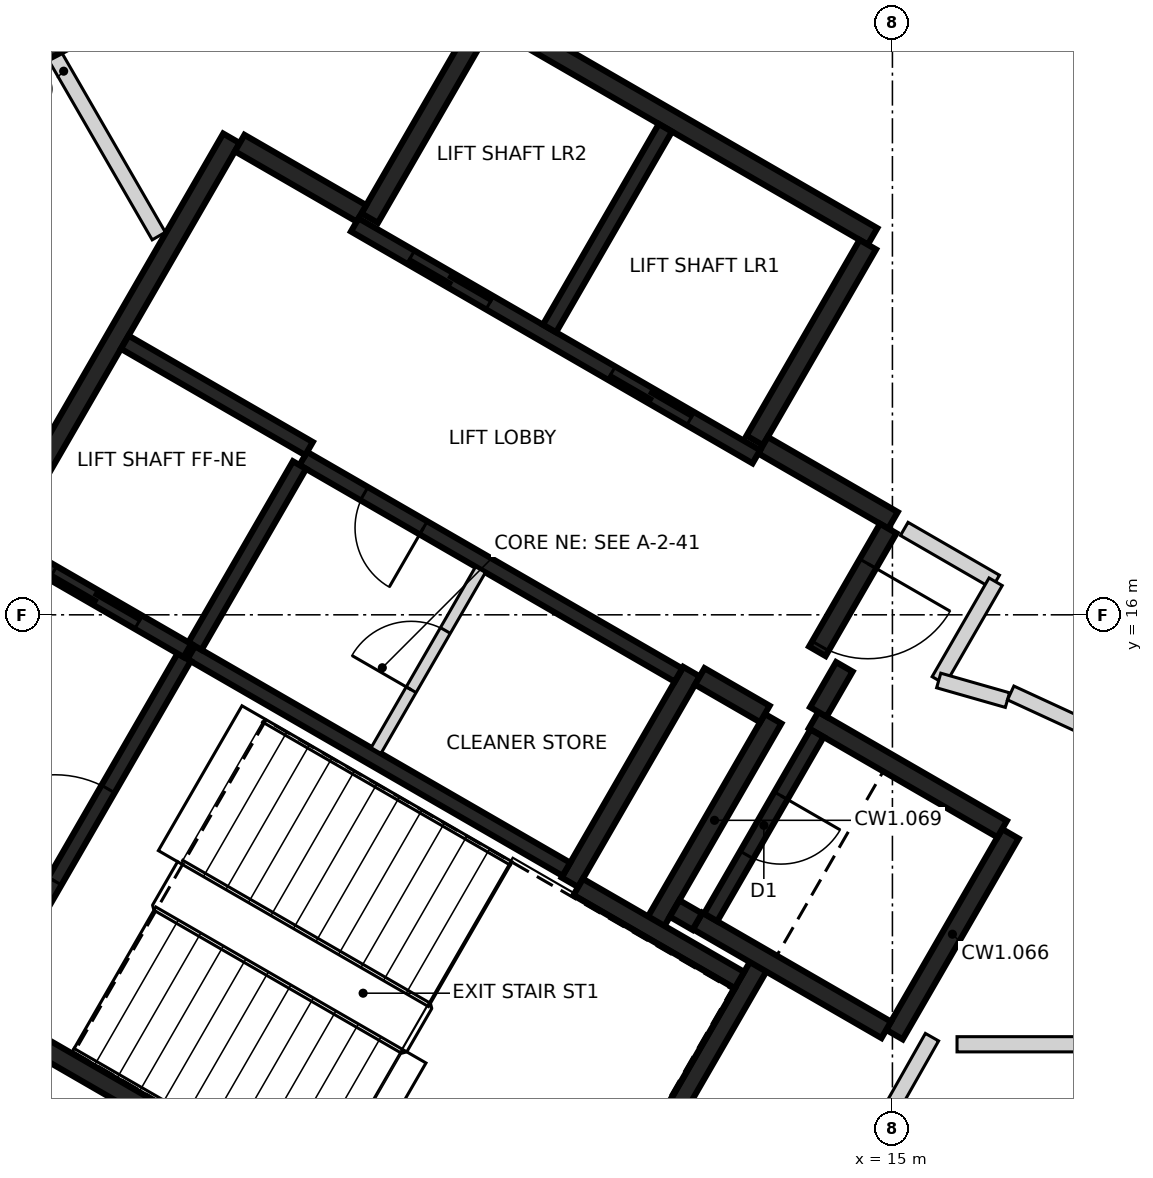
"""IFC4 building model, lengths in metres.
Left out: names, types, materials, properties, quantities, classifications, styles, units other than length and angle.
Written with IfcOpenShell. Run it as: python <this file> out.ifc"""

import sys

from ifc_helpers import new_model, si_unit, direction, frame, frame_2d, origin, origin_2d, place, context, subcontext, project, spatial, rectangle, extrude, element, fill, save


model = new_model("IFC4")
c1 = context("Model", 3, precision=1e-05, world=origin(), true_north=direction((0.0, 1.0)))
c2 = subcontext(c1, "Body", "Model", "MODEL_VIEW")
j1 = project(units=[si_unit("LENGTHUNIT", "METRE"), si_unit("PLANEANGLEUNIT", "RADIAN")], contexts=[c1])
p1 = place(None, origin())
s1 = spatial("IfcSite", under=j1, at=p1, CompositionType="ELEMENT")
p2 = place(p1, origin())
s2 = spatial("IfcBuilding", under=s1, at=p2, CompositionType="ELEMENT")
p3 = place(p2, frame((0.0, 0.0, 136.0)))
s3 = spatial("IfcBuildingStorey", under=s2, at=p3, CompositionType="ELEMENT", Elevation=136.0)
p4 = place(p3, frame((3.667, 23.896, -0.4), z_axis=(0.0, 0.0, 1.0), x_axis=(-0.463006774365, 0.886354740999, 0.0)))
e1 = element("IfcColumn", 1, at=p4, inside=s3, PredefinedType="COLUMN", context=c2, shape_type="SweptSolid", body=[
    extrude(rectangle(XDim=1.25, YDim=0.85, at=origin_2d()), origin(), (0.0, 0.0, 1.0), 3.6),
])
p5 = place(p3, frame((10.42, 6.498, 0.0), z_axis=(0.0, 0.0, 1.0), x_axis=(-0.866021906294, 0.500006057782, 0.0)))
e2 = element("IfcWall", 2, at=p5, inside=s3, PredefinedType="SHEAR", context=c2, shape_type="SweptSolid", body=[
    extrude(rectangle(XDim=11.55, YDim=0.25, at=frame_2d((5.775, 0.0))), origin(), (0.0, 0.0, 1.0), 3.2),
])
p6 = place(p5, frame((10.025, 0.0, 0.0)))
e3 = element("IfcOpeningElement", 3, at=p6, cuts=e2, PredefinedType="OPENING", context=c2, shape_type="SweptSolid", body=[
    extrude(rectangle(XDim=1.2, YDim=2.1, at=frame_2d((0.6, 1.05))), frame((0.0, 0.135, 0.0), z_axis=(0.0, -1.0, 0.0), x_axis=(1.0, 0.0, 0.0)), (0.0, 0.0, 1.0), 0.27),
])
p7 = place(p5, frame((8.725, 0.0, 0.0)))
e4 = element("IfcOpeningElement", 4, at=p7, cuts=e2, PredefinedType="OPENING", context=c2, shape_type="SweptSolid", body=[
    extrude(rectangle(XDim=1.2, YDim=2.1, at=frame_2d((0.6, 1.05))), frame((0.0, 0.135, 0.0), z_axis=(0.0, -1.0, 0.0), x_axis=(1.0, 0.0, 0.0)), (0.0, 0.0, 1.0), 0.27),
])
p8 = place(p3, frame((3.179, 16.856, 0.0), z_axis=(0.0, 0.0, 1.0), x_axis=(0.500004234368, 0.866022959057, 0.0)))
e5 = element("IfcWall", 5, at=p8, inside=s3, PredefinedType="SHEAR", context=c2, shape_type="SweptSolid", body=[
    extrude(rectangle(XDim=6.25, YDim=0.25, at=frame_2d((3.125, 0.0))), origin(), (0.0, 0.0, 1.0), 3.2),
])
p9 = place(p3, frame((9.673, 23.903, 0.0), z_axis=(0.0, 0.0, 1.0), x_axis=(0.86603616409, -0.499981362141, 0.0)))
e6 = element("IfcWall", 6, at=p9, inside=s3, PredefinedType="SHEAR", context=c2, shape_type="SweptSolid", body=[
    extrude(rectangle(XDim=5.85, YDim=0.25, at=frame_2d((2.925, 0.0))), origin(), (0.0, 0.0, 1.0), 3.2),
])
p10 = place(p3, frame((13.238, 11.378, 0.0), z_axis=(0.0, 0.0, 1.0), x_axis=(-0.500008851346, -0.866020293397, 0.0)))
e7 = element("IfcWall", 7, at=p10, inside=s3, PredefinedType="SHEAR", context=c2, shape_type="SweptSolid", body=[
    extrude(rectangle(XDim=5.51, YDim=0.25, at=frame_2d((2.755, 0.0))), origin(), (0.0, 0.0, 1.0), 3.2),
])
p11 = place(p3, frame((12.357, 15.252, 0.0), z_axis=(0.0, 0.0, 1.0), x_axis=(-0.500028443584, -0.866008981251, 0.0)))
e8 = element("IfcWall", 8, at=p11, inside=s3, PredefinedType="SHEAR", context=c2, shape_type="SweptSolid", body=[
    extrude(rectangle(XDim=3.2, YDim=0.25, at=frame_2d((1.6, 0.0))), origin(), (0.0, 0.0, 1.0), 3.2),
])
for number, where, z_axis, x_axis in (
    (9, (8.123, 21.219, 0.0), (0.0, 0.0, 1.0), (0.5, 0.866, 0.0)),
    (10, (14.676, 20.87, 0.0), (0.0, 0.0, 1.0), (-0.5, -0.866, 0.0)),
):
    element("IfcWall", number, at=place(p3, frame(where, z_axis=z_axis, x_axis=x_axis)), inside=s3, PredefinedType="SHEAR", context=c2, shape_type="SweptSolid", body=[
        extrude(rectangle(XDim=2.975, YDim=0.25, at=frame_2d((1.487, 0.0))), origin(), (0.0, 0.0, 1.0), 3.2),
    ])
p12 = place(p3, frame((16.552, 13.119, 0.0), z_axis=(0.0, 0.0, 1.0), x_axis=(-0.499978833458, -0.866037623948, 0.0)))
e11 = element("IfcWall", 11, at=p12, inside=s3, PredefinedType="SHEAR", context=c2, shape_type="SweptSolid", body=[
    extrude(rectangle(XDim=3.05, YDim=0.25, at=frame_2d((1.525, 0.0))), origin(), (0.0, 0.0, 1.0), 3.2),
])
p13 = place(p3, frame((14.918, 10.54, 0.0), z_axis=(0.0, 0.0, 1.0), x_axis=(-0.866063538972, 0.499933942099, 0.0)))
e12 = element("IfcWall", 12, at=p13, inside=s3, PredefinedType="SHEAR", context=c2, shape_type="SweptSolid", body=[
    extrude(rectangle(XDim=2.865, YDim=0.25, at=frame_2d((1.432, 0.0))), origin(), (0.0, 0.0, 1.0), 3.2),
])
p14 = place(p3, frame((13.963, 14.614, 0.0), z_axis=(0.0, 0.0, 1.0), x_axis=(0.866042235819, -0.499970844928, 0.0)))
e13 = element("IfcWall", 13, at=p14, inside=s3, PredefinedType="SHEAR", context=c2, shape_type="SweptSolid", body=[
    extrude(rectangle(XDim=2.865, YDim=0.25, at=frame_2d((1.432, 0.0))), origin(), (0.0, 0.0, 1.0), 3.2),
])
p15 = place(p3, frame((11.888, 11.961, 0.0), z_axis=(0.0, 0.0, 1.0), x_axis=(0.500003324108, 0.866023484601, 0.0)))
e14 = element("IfcWall", 14, at=p15, inside=s3, PredefinedType="SHEAR", context=c2, shape_type="SweptSolid", body=[
    extrude(rectangle(XDim=3.085, YDim=0.25, at=frame_2d((1.542, 0.0))), origin(), (0.0, 0.0, 1.0), 3.2),
])
p16 = place(p3, frame((10.865, 12.418, 0.0), z_axis=(0.0, 0.0, 1.0), x_axis=(0.866026229868, -0.499998569178, 0.0)))
e15 = element("IfcWall", 15, at=p16, inside=s3, PredefinedType="SHEAR", context=c2, shape_type="SweptSolid", body=[
    extrude(rectangle(XDim=2.449, YDim=0.25, at=frame_2d((1.225, 0.0))), origin(), (0.0, 0.0, 1.0), 3.2),
])
p17 = place(p3, frame((13.297, 18.231, 0.0), z_axis=(0.0, 0.0, 1.0), x_axis=(0.866043531843, -0.499968599967, 0.0)))
e16 = element("IfcWall", 16, at=p17, inside=s3, PredefinedType="SHEAR", context=c2, shape_type="SweptSolid", body=[
    extrude(rectangle(XDim=1.975, YDim=0.25, at=frame_2d((0.987, 0.0))), origin(), (0.0, 0.0, 1.0), 3.2),
])
p18 = place(p3, frame((6.413, 22.206, 0.0), z_axis=(0.0, 0.0, 1.0), x_axis=(0.866016279763, -0.500015802937, 0.0)))
e17 = element("IfcWall", 17, at=p18, inside=s3, PredefinedType="SHEAR", context=c2, shape_type="SweptSolid", body=[
    extrude(rectangle(XDim=1.849, YDim=0.25, at=frame_2d((0.925, 0.0))), origin(), (0.0, 0.0, 1.0), 3.2),
])
p19 = place(p3, frame((14.945, 17.135, 0.0), z_axis=(0.0, 0.0, 1.0), x_axis=(-0.499983108224, -0.866035156036, 0.0)))
e18 = element("IfcWall", 18, at=p19, inside=s3, PredefinedType="SHEAR", context=c2, shape_type="SweptSolid", body=[
    extrude(rectangle(XDim=1.865, YDim=0.25, at=frame_2d((0.932, 0.0))), origin(), (0.0, 0.0, 1.0), 3.2),
])
p20 = place(p19, frame((0.535, 0.0, 0.0)))
e19 = element("IfcOpeningElement", 19, at=p20, cuts=e18, PredefinedType="OPENING", context=c2, shape_type="SweptSolid", body=[
    extrude(rectangle(XDim=1.25, YDim=2.1, at=frame_2d((0.625, 1.05))), frame((0.0, 0.135, 0.0), z_axis=(0.0, -1.0, 0.0), x_axis=(1.0, 0.0, 0.0)), (0.0, 0.0, 1.0), 0.27),
])
p21 = place(p3, frame((13.322, 14.695, 0.0), z_axis=(0.0, 0.0, 1.0), x_axis=(-0.866017078145, 0.500014420154, 0.0)))
e20 = element("IfcWall", 20, at=p21, inside=s3, PredefinedType="SHEAR", context=c2, shape_type="SweptSolid", body=[
    extrude(rectangle(XDim=0.989, YDim=0.25, at=frame_2d((0.495, 0.0))), origin(), (0.0, 0.0, 1.0), 3.2),
])
p22 = place(p3, frame((14.368, 15.315, 0.0), z_axis=(0.0, 0.0, 1.0), x_axis=(-0.499897359611, -0.866084655132, 0.0)))
e21 = element("IfcWall", 21, at=p22, inside=s3, PredefinedType="SHEAR", context=c2, shape_type="SweptSolid", body=[
    extrude(rectangle(XDim=0.685, YDim=0.25, at=frame_2d((0.342, 0.0))), origin(), (0.0, 0.0, 1.0), 3.2),
])
p23 = place(p3, frame((12.433, 11.964, 0.0), z_axis=(0.0, 0.0, 1.0), x_axis=(-0.866055875208, 0.499947218231, 0.0)))
e22 = element("IfcWall", 22, at=p23, inside=s3, PredefinedType="SHEAR", context=c2, shape_type="SweptSolid", body=[
    extrude(rectangle(XDim=0.345, YDim=0.25, at=frame_2d((0.172, 0.0))), origin(), (0.0, 0.0, 1.0), 3.2),
])
p24 = place(p3, frame((13.21, 18.08, 0.0), z_axis=(0.0, 0.0, 1.0), x_axis=(-0.866030299012, 0.499991521122, 0.0)))
e23 = element("IfcWall", 23, at=p24, inside=s3, PredefinedType="SHEAR", context=c2, shape_type="SweptSolid", body=[
    extrude(rectangle(XDim=6.1, YDim=0.2, at=frame_2d((3.05, 0.0))), origin(), (0.0, 0.0, 1.0), 3.2),
])
p25 = place(p24, frame((1.0, 0.0, 0.0)))
e24 = element("IfcOpeningElement", 24, at=p25, cuts=e23, PredefinedType="OPENING", context=c2, shape_type="SweptSolid", body=[
    extrude(rectangle(XDim=1.2, YDim=2.1, at=frame_2d((0.6, 1.05))), frame((0.0, 0.11, 0.0), z_axis=(0.0, -1.0, 0.0), x_axis=(1.0, 0.0, 0.0)), (0.0, 0.0, 1.0), 0.22),
])
p26 = place(p24, frame((4.05, 0.0, 0.0)))
e25 = element("IfcOpeningElement", 25, at=p26, cuts=e23, PredefinedType="OPENING", context=c2, shape_type="SweptSolid", body=[
    extrude(rectangle(XDim=1.2, YDim=2.1, at=frame_2d((0.6, 1.05))), frame((0.0, 0.11, 0.0), z_axis=(0.0, -1.0, 0.0), x_axis=(1.0, 0.0, 0.0)), (0.0, 0.0, 1.0), 0.22),
])
p27 = place(p3, frame((5.775, 15.502, 0.0), z_axis=(0.0, 0.0, 1.0), x_axis=(0.866020080793, -0.500009219579, 0.0)))
e26 = element("IfcWall", 26, at=p27, inside=s3, PredefinedType="SHEAR", context=c2, shape_type="SweptSolid", body=[
    extrude(rectangle(XDim=5.699, YDim=0.2, at=frame_2d((2.85, 0.0))), origin(), (0.0, 0.0, 1.0), 3.2),
])
p28 = place(p3, frame((12.185, 15.207, 0.0), z_axis=(0.0, 0.0, 1.0), x_axis=(-0.866020080793, 0.500009219579, 0.0)))
e27 = element("IfcWall", 27, at=p28, inside=s3, PredefinedType="SHEAR", context=c2, shape_type="SweptSolid", body=[
    extrude(rectangle(XDim=5.699, YDim=0.2, at=frame_2d((2.85, 0.0))), origin(), (0.0, 0.0, 1.0), 3.2),
])
p29 = place(p28, frame((3.874, 0.0, 0.0)))
e28 = element("IfcOpeningElement", 28, at=p29, cuts=e27, PredefinedType="OPENING", context=c2, shape_type="SweptSolid", body=[
    extrude(rectangle(XDim=0.9, YDim=2.1, at=frame_2d((0.45, 1.05))), frame((0.0, 0.11, 0.0), z_axis=(0.0, -1.0, 0.0), x_axis=(1.0, 0.0, 0.0)), (0.0, 0.0, 1.0), 0.22),
])
p30 = place(p3, frame((3.057, 10.895, 0.0), z_axis=(0.0, 0.0, 1.0), x_axis=(0.499989418164, 0.866031513124, 0.0)))
e29 = element("IfcWall", 29, at=p30, inside=s3, PredefinedType="SHEAR", context=c2, shape_type="SweptSolid", body=[
    extrude(rectangle(XDim=5.251, YDim=0.2, at=frame_2d((2.625, 0.0))), origin(), (0.0, 0.0, 1.0), 3.2),
])
p31 = place(p30, frame((1.849, 0.0, 0.0)))
e30 = element("IfcOpeningElement", 30, at=p31, cuts=e29, PredefinedType="OPENING", context=c2, shape_type="SweptSolid", body=[
    extrude(rectangle(XDim=1.4, YDim=2.1, at=frame_2d((0.7, 1.05))), frame((0.0, 0.11, 0.0), z_axis=(0.0, -1.0, 0.0), x_axis=(1.0, 0.0, 0.0)), (0.0, 0.0, 1.0), 0.22),
])
p32 = place(p3, frame((10.489, 19.767, 0.0), z_axis=(0.0, 0.0, 1.0), x_axis=(0.499946628782, 0.866056215479, 0.0)))
e31 = element("IfcWall", 31, at=p32, inside=s3, PredefinedType="SHEAR", context=c2, shape_type="SweptSolid", body=[
    extrude(rectangle(XDim=3.048, YDim=0.2, at=frame_2d((1.524, 0.0))), origin(), (0.0, 0.0, 1.0), 3.2),
])
p33 = place(p3, frame((14.008, 14.442, 0.0), z_axis=(0.0, 0.0, 1.0), x_axis=(-0.499986818241, -0.866033014143, 0.0)))
e32 = element("IfcWall", 32, at=p33, inside=s3, PredefinedType="SHEAR", context=c2, shape_type="SweptSolid", body=[
    extrude(rectangle(XDim=2.798, YDim=0.2, at=frame_2d((1.399, 0.0))), origin(), (0.0, 0.0, 1.0), 3.2),
])
p34 = place(p33, frame((0.949, 0.0, 0.0)))
e33 = element("IfcOpeningElement", 33, at=p34, cuts=e32, PredefinedType="OPENING", context=c2, shape_type="SweptSolid", body=[
    extrude(rectangle(XDim=0.9, YDim=2.1, at=frame_2d((0.45, 1.05))), frame((0.0, 0.11, 0.0), z_axis=(0.0, -1.0, 0.0), x_axis=(1.0, 0.0, 0.0)), (0.0, 0.0, 1.0), 0.22),
])
p35 = place(p3, frame((7.199, 17.97, 0.0), z_axis=(0.0, 0.0, 1.0), x_axis=(-0.499968400327, -0.866043647095, 0.0)))
e34 = element("IfcWall", 34, at=p35, inside=s3, PredefinedType="SHEAR", context=c2, shape_type="SweptSolid", body=[
    extrude(rectangle(XDim=2.75, YDim=0.2, at=frame_2d((1.375, 0.0))), origin(), (0.0, 0.0, 1.0), 3.2),
])
p36 = place(p3, frame((5.725, 15.531, 0.0), z_axis=(0.0, 0.0, 1.0), x_axis=(-0.866037306777, 0.499979382845, 0.0)))
e35 = element("IfcWall", 35, at=p36, inside=s3, PredefinedType="SHEAR", context=c2, shape_type="SweptSolid", body=[
    extrude(rectangle(XDim=2.742, YDim=0.2, at=frame_2d((1.371, 0.0))), origin(), (0.0, 0.0, 1.0), 3.2),
])
p37 = place(p36, frame((0.743, 0.0, 0.0)))
e36 = element("IfcOpeningElement", 36, at=p37, cuts=e35, PredefinedType="OPENING", context=c2, shape_type="SweptSolid", body=[
    extrude(rectangle(XDim=1.3, YDim=2.1, at=frame_2d((0.65, 1.05))), frame((0.0, 0.11, 0.0), z_axis=(0.0, -1.0, 0.0), x_axis=(1.0, 0.0, 0.0)), (0.0, 0.0, 1.0), 0.22),
])
p38 = place(p3, frame((4.901, 19.586, 0.0), z_axis=(0.0, 0.0, 1.0), x_axis=(0.866022890907, -0.500004352405, 0.0)))
e37 = element("IfcWall", 37, at=p38, inside=s3, PredefinedType="SHEAR", context=c2, shape_type="SweptSolid", body=[
    extrude(rectangle(XDim=2.799, YDim=0.2, at=frame_2d((1.399, 0.0))), origin(), (0.0, 0.0, 1.0), 3.2),
])
p39 = place(p3, frame((8.207, 14.214, 0.0), z_axis=(0.0, 0.0, 1.0), x_axis=(0.499922376475, 0.866070215109, 0.0)))
e38 = element("IfcWall", 38, at=p39, inside=s3, PredefinedType="PARTITIONING", context=c2, shape_type="SweptSolid", body=[
    extrude(rectangle(XDim=2.749, YDim=0.15, at=frame_2d((1.374, 0.0))), origin(), (0.0, 0.0, 1.0), 3.2),
])
p40 = place(p39, frame((0.924, 0.0, 0.0)))
e39 = element("IfcOpeningElement", 39, at=p40, cuts=e38, PredefinedType="OPENING", context=c2, shape_type="SweptSolid", body=[
    extrude(rectangle(XDim=0.9, YDim=2.1, at=frame_2d((0.45, 1.05))), frame((0.0, 0.085, 0.0), z_axis=(0.0, -1.0, 0.0), x_axis=(1.0, 0.0, 0.0)), (0.0, 0.0, 1.0), 0.17),
])
p41 = place(p3, frame((14.066, 7.876, 0.0), z_axis=(0.0, 0.0, 1.0), x_axis=(0.492812174249, 0.870135714077, 0.0)))
e40 = element("IfcWall", 40, at=p41, inside=s3, PredefinedType="PARTITIONING", context=c2, shape_type="SweptSolid", body=[
    extrude(rectangle(XDim=2.951, YDim=0.2, at=frame_2d((1.476, 0.0))), origin(), (0.0, 0.0, 1.0), 3.2),
])
p42 = place(p3, frame((15.156, 17.13, 0.0), z_axis=(0.0, 0.0, 1.0), x_axis=(0.865755062894, -0.500467952093, 0.0)))
e41 = element("IfcWall", 41, at=p42, inside=s3, PredefinedType="PARTITIONING", context=c2, shape_type="SweptSolid", body=[
    extrude(rectangle(XDim=1.389, YDim=0.2, at=frame_2d((0.694, 0.0))), origin(), (0.0, 0.0, 1.0), 3.2),
])
p43 = place(p3, frame((15.609, 15.136, 0.0), z_axis=(0.0, 0.0, 1.0), x_axis=(0.499501622561, 0.866312950993, 0.0)))
e42 = element("IfcWall", 42, at=p43, inside=s3, PredefinedType="PARTITIONING", context=c2, shape_type="SweptSolid", body=[
    extrude(rectangle(XDim=1.5, YDim=0.2, at=frame_2d((0.75, 0.0))), origin(), (0.0, 0.0, 1.0), 3.2),
])
p44 = place(p3, frame((15.609, 15.136, 0.0), z_axis=(0.0, 0.0, 1.0), x_axis=(0.961592512205, -0.274481038455, 0.0)))
e43 = element("IfcWall", 43, at=p44, inside=s3, PredefinedType="PARTITIONING", context=c2, shape_type="SweptSolid", body=[
    extrude(rectangle(XDim=0.94, YDim=0.2, at=frame_2d((0.47, 0.0))), origin(), (0.0, 0.0, 1.0), 3.2),
])
p45 = place(p3, frame((15.85, 10.35, 0.0), z_axis=(0.0, 0.0, 1.0), x_axis=(1.0, 0.0, 0.0)))
e44 = element("IfcWall", 44, at=p45, inside=s3, PredefinedType="PARTITIONING", context=c2, shape_type="SweptSolid", body=[
    extrude(rectangle(XDim=2.5, YDim=0.2, at=frame_2d((1.25, 0.0))), origin(), (0.0, 0.0, 1.0), 3.2),
])
p46 = place(p3, frame((16.556, 14.972, 0.0), z_axis=(0.0, 0.0, 1.0), x_axis=(0.907999158806, -0.418971989048, 0.0)))
e45 = element("IfcWall", 45, at=p46, inside=s3, PredefinedType="PARTITIONING", context=c2, shape_type="SweptSolid", body=[
    extrude(rectangle(XDim=1.976, YDim=0.2, at=frame_2d((0.988, 0.0))), origin(), (0.0, 0.0, 1.0), 3.2),
])
p47 = place(p3, frame((2.845, 25.321, 0.0), z_axis=(0.0, 0.0, 1.0), x_axis=(0.499730893997, -0.86618071647, 0.0)))
e46 = element("IfcWall", 46, at=p47, inside=s3, PredefinedType="PARTITIONING", context=c2, shape_type="SweptSolid", body=[
    extrude(rectangle(XDim=5.008, YDim=0.2, at=frame_2d((2.504, 0.0))), origin(), (0.0, 0.0, 1.0), 3.2),
])
p48 = place(p37, origin())
e47 = element("IfcDoor", 47, at=p48, inside=s3, OperationType="SLIDING_TO_LEFT", PredefinedType="DOOR", context=c2, shape_type="SweptSolid", body=[
    extrude(rectangle(XDim=1.3, YDim=2.1, at=frame_2d((0.65, 1.05))), frame((0.0, 0.025, 0.0), z_axis=(0.0, -1.0, 0.0), x_axis=(1.0, 0.0, 0.0)), (0.0, 0.0, 1.0), 0.05),
])
fill(e36, e47)
p49 = place(p25, origin())
e48 = element("IfcDoor", 48, at=p49, inside=s3, OperationType="DOUBLE_DOOR_SLIDING", PredefinedType="DOOR", context=c2, shape_type="SweptSolid", body=[
    extrude(rectangle(XDim=1.2, YDim=2.1, at=frame_2d((0.6, 1.05))), frame((0.0, 0.025, 0.0), z_axis=(0.0, -1.0, 0.0), x_axis=(1.0, 0.0, 0.0)), (0.0, 0.0, 1.0), 0.05),
])
fill(e24, e48)
p50 = place(p26, origin())
e49 = element("IfcDoor", 49, at=p50, inside=s3, OperationType="DOUBLE_DOOR_SLIDING", PredefinedType="DOOR", context=c2, shape_type="SweptSolid", body=[
    extrude(rectangle(XDim=1.2, YDim=2.1, at=frame_2d((0.6, 1.05))), frame((0.0, 0.025, 0.0), z_axis=(0.0, -1.0, 0.0), x_axis=(1.0, 0.0, 0.0)), (0.0, 0.0, 1.0), 0.05),
])
fill(e25, e49)
p51 = place(p20, origin())
e50 = element("IfcDoor", 50, at=p51, inside=s3, OperationType="SINGLE_SWING_LEFT", PredefinedType="DOOR", context=c2, shape_type="SweptSolid", body=[
    extrude(rectangle(XDim=1.25, YDim=2.1, at=frame_2d((0.625, 1.05))), frame((0.0, 0.025, 0.0), z_axis=(0.0, -1.0, 0.0), x_axis=(1.0, 0.0, 0.0)), (0.0, 0.0, 1.0), 0.05),
])
fill(e19, e50)
p52 = place(p31, origin())
e51 = element("IfcDoor", 51, at=p52, inside=s3, OperationType="SINGLE_SWING_LEFT", PredefinedType="DOOR", context=c2, shape_type="SweptSolid", body=[
    extrude(rectangle(XDim=1.4, YDim=2.1, at=frame_2d((0.7, 1.05))), frame((0.0, 0.025, 0.0), z_axis=(0.0, -1.0, 0.0), x_axis=(1.0, 0.0, 0.0)), (0.0, 0.0, 1.0), 0.05),
])
fill(e30, e51)
p53 = place(p29, origin())
e52 = element("IfcDoor", 52, at=p53, inside=s3, OperationType="SINGLE_SWING_RIGHT", PredefinedType="DOOR", context=c2, shape_type="SweptSolid", body=[
    extrude(rectangle(XDim=0.9, YDim=2.1, at=frame_2d((0.45, 1.05))), frame((0.0, 0.025, 0.0), z_axis=(0.0, -1.0, 0.0), x_axis=(1.0, 0.0, 0.0)), (0.0, 0.0, 1.0), 0.05),
])
fill(e28, e52)
p54 = place(p34, origin())
e53 = element("IfcDoor", 53, at=p54, inside=s3, OperationType="SINGLE_SWING_LEFT", PredefinedType="DOOR", context=c2, shape_type="SweptSolid", body=[
    extrude(rectangle(XDim=0.9, YDim=2.1, at=frame_2d((0.45, 1.05))), frame((0.0, 0.025, 0.0), z_axis=(0.0, -1.0, 0.0), x_axis=(1.0, 0.0, 0.0)), (0.0, 0.0, 1.0), 0.05),
])
fill(e33, e53)
p55 = place(p40, origin())
e54 = element("IfcDoor", 54, at=p55, inside=s3, OperationType="SINGLE_SWING_RIGHT", PredefinedType="DOOR", context=c2, shape_type="SweptSolid", body=[
    extrude(rectangle(XDim=0.9, YDim=2.1, at=frame_2d((0.45, 1.05))), frame((0.0, 0.025, 0.0), z_axis=(0.0, -1.0, 0.0), x_axis=(1.0, 0.0, 0.0)), (0.0, 0.0, 1.0), 0.05),
])
fill(e39, e54)
save(model, sys.argv[1])
